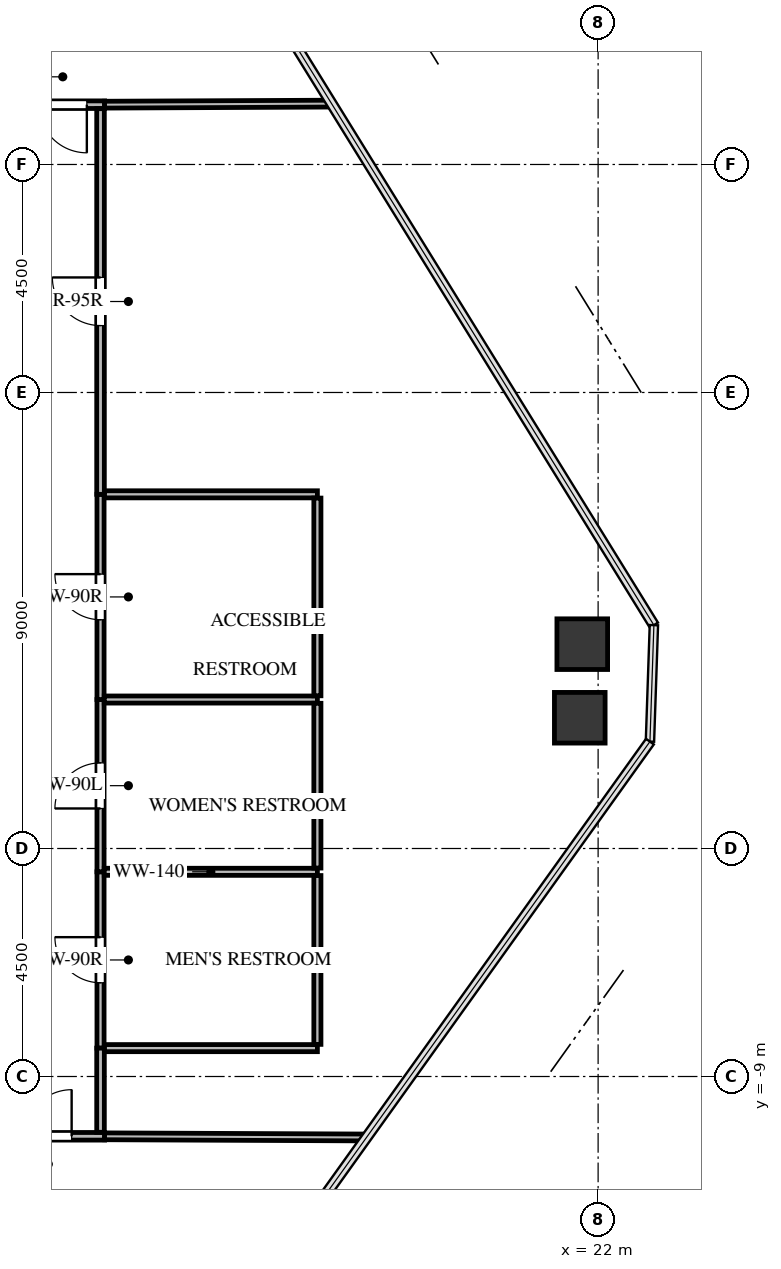
"""IFC4 building model, lengths in metres.
Left out: names, types, materials, properties, quantities, classifications, styles, units other than length and angle.
Written with IfcOpenShell. Run it as: python <this file> out.ifc"""

import sys

from ifc_helpers import new_model, si_unit, direction, frame, frame_2d, origin, origin_2d, place, context, subcontext, project, spatial, rectangle, extrude, source, transform, mapped, element, fill, save


model = new_model("IFC4")
c1 = context("Model", 3, precision=1e-05, world=origin(), true_north=direction((0.0, 1.0)))
c2 = subcontext(c1, "Body", "Model", "MODEL_VIEW")
j1 = project(units=[si_unit("LENGTHUNIT", "METRE"), si_unit("PLANEANGLEUNIT", "RADIAN")], contexts=[c1])
p1 = place(None, origin())
s1 = spatial("IfcSite", under=j1, at=p1, CompositionType="ELEMENT")
p2 = place(p1, origin())
s2 = spatial("IfcBuilding", under=s1, at=p2, CompositionType="ELEMENT")
p3 = place(p2, frame((0.0, 0.0, 173.8)))
s3 = spatial("IfcBuildingStorey", under=s2, at=p3, CompositionType="ELEMENT", Elevation=173.8)
m1 = source(origin(), c2, "Body", "SweptSolid", [
    extrude(rectangle(XDim=1.0, YDim=1.0, at=origin_2d()), origin(), (0.0, 0.0, 1.0), 3.3),
])
for number, where, z_axis, x_axis in (
    (1, (21.687, -0.467, -0.24), (0.0, 0.0, 1.0), (1.0, 0.0, 0.0)),
    (2, (21.638, -1.92, -0.24), (0.0, 0.0, 1.0), (1.0, 0.0, 0.0)),
):
    element("IfcColumn", number, at=place(p3, frame(where, z_axis=z_axis, x_axis=x_axis)), inside=s3, PredefinedType="COLUMN", context=c2, shape_type="MappedRepresentation", body=[
        mapped(m1, transform((0.0, 0.0, 0.0), x_axis=(1.0, 0.0, 0.0), y_axis=(0.0, 1.0, 0.0), z_axis=(0.0, 0.0, 1.0), scale=1.0)),
    ])
p4 = place(p3, frame((12.18, -8.44, 0.0), z_axis=(0.0, 0.0, 1.0), x_axis=(0.0, 1.0, 0.0)))
e3 = element("IfcWall", 3, at=p4, inside=s3, PredefinedType="PARTITIONING", context=c2, shape_type="SweptSolid", body=[
    extrude(rectangle(XDim=3.48, YDim=0.14, at=frame_2d((1.74, 0.0))), origin(), (0.0, 0.0, 1.0), 3.045),
])
p5 = place(p4, frame((1.29, 0.0, 0.0)))
e4 = element("IfcOpeningElement", 4, at=p5, cuts=e3, PredefinedType="OPENING", context=c2, shape_type="SweptSolid", body=[
    extrude(rectangle(XDim=0.9, YDim=2.05, at=frame_2d((0.45, 1.025))), frame((0.0, 0.08, 0.0), z_axis=(0.0, -1.0, 0.0), x_axis=(1.0, 0.0, 0.0)), (0.0, 0.0, 1.0), 0.16),
])
p6 = place(p3, frame((12.18, -4.96, 0.0), z_axis=(0.0, 0.0, 1.0), x_axis=(0.0, 1.0, 0.0)))
e5 = element("IfcWall", 5, at=p6, inside=s3, PredefinedType="PARTITIONING", context=c2, shape_type="SweptSolid", body=[
    extrude(rectangle(XDim=3.4, YDim=0.14, at=frame_2d((1.7, 0.0))), origin(), (0.0, 0.0, 1.0), 3.045),
])
p7 = place(p6, frame((1.25, 0.0, 0.0)))
e6 = element("IfcOpeningElement", 6, at=p7, cuts=e5, PredefinedType="OPENING", context=c2, shape_type="SweptSolid", body=[
    extrude(rectangle(XDim=0.9, YDim=2.05, at=frame_2d((0.45, 1.025))), frame((0.0, 0.08, 0.0), z_axis=(0.0, -1.0, 0.0), x_axis=(1.0, 0.0, 0.0)), (0.0, 0.0, 1.0), 0.16),
])
p8 = place(p3, frame((12.18, -1.56, 0.0), z_axis=(0.0, 0.0, 1.0), x_axis=(0.0, 1.0, 0.0)))
e7 = element("IfcWall", 7, at=p8, inside=s3, PredefinedType="PARTITIONING", context=c2, shape_type="SweptSolid", body=[
    extrude(rectangle(XDim=4.05, YDim=0.14, at=frame_2d((2.025, 0.0))), origin(), (0.0, 0.0, 1.0), 2.242),
])
p9 = place(p8, frame((1.575, 0.0, 0.0)))
e8 = element("IfcOpeningElement", 8, at=p9, cuts=e7, PredefinedType="OPENING", context=c2, shape_type="SweptSolid", body=[
    extrude(rectangle(XDim=0.9, YDim=2.05, at=frame_2d((0.45, 1.025))), frame((0.0, 0.08, 0.0), z_axis=(0.0, -1.0, 0.0), x_axis=(1.0, 0.0, 0.0)), (0.0, 0.0, 1.0), 0.16),
])
p10 = place(p3, frame((12.26, 10.18, 0.0), z_axis=(0.0, 0.0, 1.0), x_axis=(-1.0, 0.0, 0.0)))
e9 = element("IfcWall", 9, at=p10, inside=s3, PredefinedType="PARTITIONING", context=c2, shape_type="SweptSolid", body=[
    extrude(rectangle(XDim=3.72, YDim=0.15, at=frame_2d((1.86, 0.0))), origin(), (0.0, 0.0, 1.0), 2.242),
])
p11 = place(p10, frame((0.35, 0.0, 0.0)))
e10 = element("IfcOpeningElement", 10, at=p11, cuts=e9, PredefinedType="OPENING", context=c2, shape_type="SweptSolid", body=[
    extrude(rectangle(XDim=0.95, YDim=2.1, at=frame_2d((0.475, 1.05))), frame((0.0, 0.085, 0.0), z_axis=(0.0, -1.0, 0.0), x_axis=(1.0, 0.0, 0.0)), (0.0, 0.0, 1.0), 0.17),
])
p12 = place(p3, frame((10.04, -10.18, 0.0), z_axis=(0.0, 0.0, 1.0), x_axis=(1.0, 0.0, 0.0)))
e11 = element("IfcWall", 11, at=p12, inside=s3, PredefinedType="PARTITIONING", context=c2, shape_type="SweptSolid", body=[
    extrude(rectangle(XDim=2.22, YDim=0.15, at=frame_2d((1.11, 0.0))), origin(), (0.0, 0.0, 1.0), 3.045),
])
p13 = place(p12, frame((0.65, 0.0, 0.0)))
e12 = element("IfcOpeningElement", 12, at=p13, cuts=e11, PredefinedType="OPENING", context=c2, shape_type="SweptSolid", body=[
    extrude(rectangle(XDim=0.92, YDim=2.1, at=frame_2d((0.46, 1.05))), frame((0.0, 0.085, 0.0), z_axis=(0.0, -1.0, 0.0), x_axis=(1.0, 0.0, 0.0)), (0.0, 0.0, 1.0), 0.17),
])
p14 = place(p3, frame((12.18, 2.49, 0.0), z_axis=(0.0, 0.0, 1.0), x_axis=(0.0, 1.0, 0.0)))
e13 = element("IfcWall", 13, at=p14, inside=s3, PredefinedType="PARTITIONING", context=c2, shape_type="SweptSolid", body=[
    extrude(rectangle(XDim=7.611, YDim=0.15, at=frame_2d((3.806, 0.0))), origin(), (0.0, 0.0, 1.0), 3.045),
])
p15 = place(p14, frame((3.331, 0.0, 0.0)))
e14 = element("IfcOpeningElement", 14, at=p15, cuts=e13, PredefinedType="OPENING", context=c2, shape_type="SweptSolid", body=[
    extrude(rectangle(XDim=0.95, YDim=2.1, at=frame_2d((0.475, 1.05))), frame((0.0, 0.085, 0.0), z_axis=(0.0, -1.0, 0.0), x_axis=(1.0, 0.0, 0.0)), (0.0, 0.0, 1.0), 0.17),
])
p16 = place(p3, frame((12.18, -10.101, 0.0), z_axis=(0.0, 0.0, 1.0), x_axis=(0.0, 1.0, 0.0)))
e15 = element("IfcWall", 15, at=p16, inside=s3, PredefinedType="PARTITIONING", context=c2, shape_type="SweptSolid", body=[
    extrude(rectangle(XDim=1.661, YDim=0.15, at=frame_2d((0.831, 0.0))), origin(), (0.0, 0.0, 1.0), 3.045),
])
p17 = place(p3, frame((12.254, -4.96, 0.0), z_axis=(0.0, 0.0, 1.0), x_axis=(1.0, 0.0, 0.0)))
e16 = element("IfcWall", 16, at=p17, inside=s3, PredefinedType="PARTITIONING", context=c2, shape_type="SweptSolid", body=[
    extrude(rectangle(XDim=4.206, YDim=0.14, at=frame_2d((2.103, 0.0))), origin(), (0.0, 0.0, 1.0), 3.045),
])
p18 = place(p3, frame((16.46, -8.44, 0.0), z_axis=(0.0, 0.0, 1.0), x_axis=(-1.0, 0.0, 0.0)))
e17 = element("IfcWall", 17, at=p18, inside=s3, PredefinedType="PARTITIONING", context=c2, shape_type="SweptSolid", body=[
    extrude(rectangle(XDim=4.201, YDim=0.14, at=frame_2d((2.101, 0.0))), origin(), (0.0, 0.0, 1.0), 3.045),
])
p19 = place(p3, frame((16.46, -5.034, 0.0), z_axis=(0.0, 0.0, 1.0), x_axis=(0.0, -1.0, 0.0)))
e18 = element("IfcWall", 18, at=p19, inside=s3, PredefinedType="PARTITIONING", context=c2, shape_type="SweptSolid", body=[
    extrude(rectangle(XDim=3.332, YDim=0.14, at=frame_2d((1.666, 0.0))), origin(), (0.0, 0.0, 1.0), 3.045),
])
p20 = place(p3, frame((12.254, -1.56, 0.0), z_axis=(0.0, 0.0, 1.0), x_axis=(1.0, 0.0, 0.0)))
e19 = element("IfcWall", 19, at=p20, inside=s3, PredefinedType="PARTITIONING", context=c2, shape_type="SweptSolid", body=[
    extrude(rectangle(XDim=4.206, YDim=0.14, at=frame_2d((2.103, 0.0))), origin(), (0.0, 0.0, 1.0), 3.045),
])
p21 = place(p3, frame((16.46, -1.634, 0.0), z_axis=(0.0, 0.0, 1.0), x_axis=(0.0, -1.0, 0.0)))
e20 = element("IfcWall", 20, at=p21, inside=s3, PredefinedType="PARTITIONING", context=c2, shape_type="SweptSolid", body=[
    extrude(rectangle(XDim=3.252, YDim=0.14, at=frame_2d((1.626, 0.0))), origin(), (0.0, 0.0, 1.0), 3.045),
])
p22 = place(p3, frame((12.259, 2.49, 0.0), z_axis=(0.0, 0.0, 1.0), x_axis=(1.0, 0.0, 0.0)))
e21 = element("IfcWall", 21, at=p22, inside=s3, PredefinedType="PARTITIONING", context=c2, shape_type="SweptSolid", body=[
    extrude(rectangle(XDim=4.201, YDim=0.14, at=frame_2d((2.101, 0.0))), origin(), (0.0, 0.0, 1.0), 3.045),
])
p23 = place(p3, frame((16.46, 2.416, 0.0), z_axis=(0.0, 0.0, 1.0), x_axis=(0.0, -1.0, 0.0)))
e22 = element("IfcWall", 22, at=p23, inside=s3, PredefinedType="PARTITIONING", context=c2, shape_type="SweptSolid", body=[
    extrude(rectangle(XDim=3.902, YDim=0.14, at=frame_2d((1.951, 0.0))), origin(), (0.0, 0.0, 1.0), 2.242),
])
p24 = place(p3, frame((16.74, 10.201, 0.0), z_axis=(0.0, 0.0, 1.0), x_axis=(-0.999989522694, -0.004577608714, 0.0)))
e23 = element("IfcWall", 23, at=p24, inside=s3, PredefinedType="PARTITIONING", context=c2, shape_type="SweptSolid", body=[
    extrude(rectangle(XDim=4.48, YDim=0.135, at=frame_2d((2.24, 0.0))), origin(), (0.0, 0.0, 1.0), 2.399),
])
p25 = place(p3, frame((12.26, -10.18, 0.0), z_axis=(0.0, 0.0, 1.0), x_axis=(0.999990144117, -0.004439782427, 0.0)))
e24 = element("IfcWall", 24, at=p25, inside=s3, PredefinedType="PARTITIONING", context=c2, shape_type="SweptSolid", body=[
    extrude(rectangle(XDim=5.169, YDim=0.135, at=frame_2d((2.584, 0.0))), origin(), (0.0, 0.0, 1.0), 2.399),
])
m2 = source(origin(), c2, "Body", "SweptSolid", [
    extrude(rectangle(XDim=0.9, YDim=2.05, at=frame_2d((0.45, 1.025))), frame((0.0, 0.025, 0.0), z_axis=(0.0, -1.0, 0.0), x_axis=(1.0, 0.0, 0.0)), (0.0, 0.0, 1.0), 0.05),
])
p26 = place(p5, origin())
e25 = element("IfcDoor", 25, at=p26, inside=s3, OperationType="SINGLE_SWING_RIGHT", PredefinedType="DOOR", context=c2, shape_type="MappedRepresentation", body=[
    mapped(m2, transform((0.0, 0.0, 0.0), x_axis=(1.0, 0.0, 0.0), y_axis=(0.0, 1.0, 0.0), z_axis=(0.0, 0.0, 1.0), scale=1.0)),
])
fill(e4, e25)
m3 = source(origin(), c2, "Body", "SweptSolid", [
    extrude(rectangle(XDim=0.9, YDim=2.05, at=frame_2d((0.45, 1.025))), frame((0.0, 0.025, 0.0), z_axis=(0.0, -1.0, 0.0), x_axis=(1.0, 0.0, 0.0)), (0.0, 0.0, 1.0), 0.05),
])
p27 = place(p7, origin())
e26 = element("IfcDoor", 26, at=p27, inside=s3, OperationType="SINGLE_SWING_LEFT", PredefinedType="DOOR", context=c2, shape_type="MappedRepresentation", body=[
    mapped(m3, transform((0.0, 0.0, 0.0), x_axis=(1.0, 0.0, 0.0), y_axis=(0.0, 1.0, 0.0), z_axis=(0.0, 0.0, 1.0), scale=1.0)),
])
fill(e6, e26)
p28 = place(p9, origin())
e27 = element("IfcDoor", 27, at=p28, inside=s3, OperationType="SINGLE_SWING_RIGHT", PredefinedType="DOOR", context=c2, shape_type="MappedRepresentation", body=[
    mapped(m2, transform((0.0, 0.0, 0.0), x_axis=(1.0, 0.0, 0.0), y_axis=(0.0, 1.0, 0.0), z_axis=(0.0, 0.0, 1.0), scale=1.0)),
])
fill(e8, e27)
m4 = source(origin(), c2, "Body", "SweptSolid", [
    extrude(rectangle(XDim=0.95, YDim=2.1, at=frame_2d((0.475, 1.05))), frame((0.0, 0.025, 0.0), z_axis=(0.0, -1.0, 0.0), x_axis=(1.0, 0.0, 0.0)), (0.0, 0.0, 1.0), 0.05),
])
p29 = place(p11, origin())
e28 = element("IfcDoor", 28, at=p29, inside=s3, OperationType="SINGLE_SWING_LEFT", PredefinedType="DOOR", context=c2, shape_type="MappedRepresentation", body=[
    mapped(m4, transform((0.0, 0.0, 0.0), x_axis=(1.0, 0.0, 0.0), y_axis=(0.0, 1.0, 0.0), z_axis=(0.0, 0.0, 1.0), scale=1.0)),
])
fill(e10, e28)
m5 = source(origin(), c2, "Body", "SweptSolid", [
    extrude(rectangle(XDim=0.92, YDim=2.1, at=frame_2d((0.46, 1.05))), frame((0.0, 0.025, 0.0), z_axis=(0.0, -1.0, 0.0), x_axis=(1.0, 0.0, 0.0)), (0.0, 0.0, 1.0), 0.05),
])
p30 = place(p13, origin())
e29 = element("IfcDoor", 29, at=p30, inside=s3, OperationType="SINGLE_SWING_RIGHT", PredefinedType="DOOR", context=c2, shape_type="MappedRepresentation", body=[
    mapped(m5, transform((0.0, 0.0, 0.0), x_axis=(1.0, 0.0, 0.0), y_axis=(0.0, 1.0, 0.0), z_axis=(0.0, 0.0, 1.0), scale=1.0)),
])
fill(e12, e29)
m6 = source(origin(), c2, "Body", "SweptSolid", [
    extrude(rectangle(XDim=0.95, YDim=2.1, at=frame_2d((0.475, 1.05))), frame((0.0, 0.025, 0.0), z_axis=(0.0, -1.0, 0.0), x_axis=(1.0, 0.0, 0.0)), (0.0, 0.0, 1.0), 0.05),
])
p31 = place(p15, origin())
e30 = element("IfcDoor", 30, at=p31, inside=s3, OperationType="SINGLE_SWING_RIGHT", PredefinedType="DOOR", context=c2, shape_type="MappedRepresentation", body=[
    mapped(m6, transform((0.0, 0.0, 0.0), x_axis=(1.0, 0.0, 0.0), y_axis=(0.0, 1.0, 0.0), z_axis=(0.0, 0.0, 1.0), scale=1.0)),
])
fill(e14, e30)
save(model, sys.argv[1])
